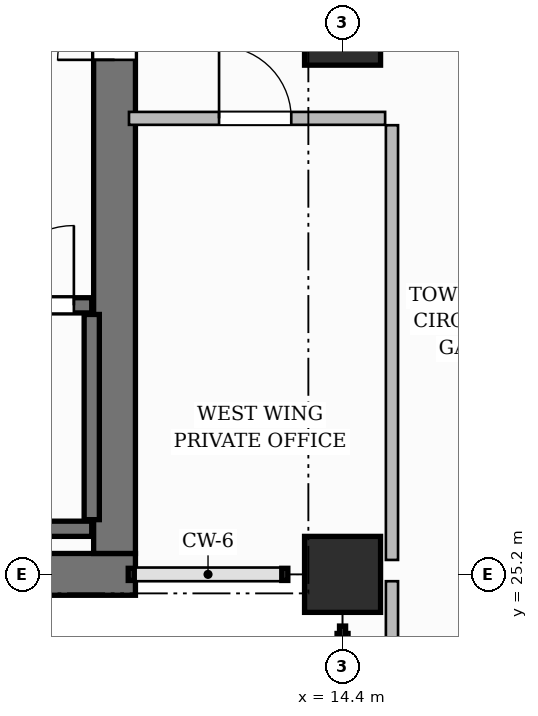
"""IFC4 building model, lengths in metres.
Left out: names, types, materials, properties, quantities, classifications, styles, units other than length and angle.
Written with IfcOpenShell. Run it as: python <this file> out.ifc"""

import sys

from ifc_helpers import new_model, si_unit, direction, frame, frame_2d, origin, origin_2d, place, context, subcontext, project, spatial, rectangle, extrude, source, transform, mapped, element, fill, save


model = new_model("IFC4")
c1 = context("Model", 3, precision=1e-05, world=origin(), true_north=direction((0.0, 1.0)))
c2 = subcontext(c1, "Body", "Model", "MODEL_VIEW")
j1 = project(units=[si_unit("LENGTHUNIT", "METRE"), si_unit("PLANEANGLEUNIT", "RADIAN")], contexts=[c1])
p1 = place(None, origin())
s1 = spatial("IfcSite", under=j1, at=p1, CompositionType="ELEMENT")
p2 = place(p1, origin())
s2 = spatial("IfcBuilding", under=s1, at=p2, CompositionType="ELEMENT")
p3 = place(p2, frame((0.0, 0.0, 122.9)))
s3 = spatial("IfcBuildingStorey", under=s2, at=p3, CompositionType="ELEMENT", Elevation=122.9)
p4 = place(p3, frame((3.325, 25.2, 0.0), z_axis=(0.0, 0.0, 1.0), x_axis=(1.0, 0.0, 0.0)))
e1 = element("IfcWall", 1, at=p4, inside=s3, PredefinedType="SHEAR", context=c2, shape_type="SweptSolid", body=[
    extrude(rectangle(XDim=8.35, YDim=0.55, at=frame_2d((4.175, 0.0))), origin(), (0.0, 0.0, 1.0), 3.7),
])
p5 = place(p3, frame((11.4, 25.475, 0.0), z_axis=(0.0, 0.0, 1.0), x_axis=(0.0, 1.0, 0.0)))
e2 = element("IfcWall", 2, at=p5, inside=s3, PredefinedType="SHEAR", context=c2, shape_type="SweptSolid", body=[
    extrude(rectangle(XDim=13.85, YDim=0.55, at=frame_2d((6.925, 0.0))), origin(), (0.0, 0.0, 1.0), 3.7),
])
p6 = place(p5, frame((6.495, 0.0, 0.0)))
e3 = element("IfcOpeningElement", 3, at=p6, cuts=e2, PredefinedType="OPENING", context=c2, shape_type="SweptSolid", body=[
    extrude(rectangle(XDim=1.5, YDim=2.2, at=frame_2d((0.75, 1.1))), frame((0.0, 0.285, 0.0), z_axis=(0.0, -1.0, 0.0), x_axis=(1.0, 0.0, 0.0)), (0.0, 0.0, 1.0), 0.57),
])
m1 = source(origin(), c2, "Body", "SweptSolid", [
    extrude(rectangle(XDim=1.0, YDim=1.0, at=origin_2d()), origin(), (0.0, 0.0, 1.0), 3.7),
])
for number, where, z_axis, x_axis in (
    (4, (14.4, 25.2, 0.0), (0.0, 0.0, 1.0), (1.0, 0.0, 0.0)),
    (5, (14.4, 32.4, 0.0), (0.0, 0.0, 1.0), (1.0, 0.0, 0.0)),
):
    element("IfcColumn", number, at=place(p3, frame(where, z_axis=z_axis, x_axis=x_axis)), inside=s3, PredefinedType="COLUMN", context=c2, shape_type="MappedRepresentation", body=[
        mapped(m1, transform((0.0, 0.0, 0.0), scale=1.0)),
    ])
p7 = place(p3, frame((4.0, 25.8, 0.0), z_axis=(0.0, 0.0, 1.0), x_axis=(1.0, 0.0, 0.0)))
e6 = element("IfcWall", 6, at=p7, inside=s3, PredefinedType="SHEAR", context=c2, shape_type="SweptSolid", body=[
    extrude(rectangle(XDim=7.1, YDim=0.2, at=frame_2d((3.55, 0.0))), origin(), (0.0, 0.0, 1.0), 3.7),
])
p8 = place(p3, frame((11.1, 25.92, 0.0), z_axis=(0.0, 0.0, 1.0), x_axis=(0.0, 1.0, 0.0)))
e7 = element("IfcWall", 7, at=p8, inside=s3, PredefinedType="SHEAR", context=c2, shape_type="SweptSolid", body=[
    extrude(rectangle(XDim=2.7, YDim=0.2, at=frame_2d((1.35, 0.0))), origin(), (0.0, 0.0, 1.0), 3.7),
])
p9 = place(p3, frame((4.0, 28.74, 0.0), z_axis=(0.0, 0.0, 1.0), x_axis=(1.0, 0.0, 0.0)))
e8 = element("IfcWall", 8, at=p9, inside=s3, PredefinedType="SHEAR", context=c2, shape_type="SweptSolid", body=[
    extrude(rectangle(XDim=7.1, YDim=0.2, at=frame_2d((3.55, 0.0))), origin(), (0.0, 0.0, 1.0), 3.7),
])
p10 = place(p9, frame((5.815, 0.0, 0.0)))
e9 = element("IfcOpeningElement", 9, at=p10, cuts=e8, PredefinedType="OPENING", context=c2, shape_type="SweptSolid", body=[
    extrude(rectangle(XDim=1.05, YDim=2.2, at=frame_2d((0.525, 1.1))), frame((0.0, 0.11, 0.0), z_axis=(0.0, -1.0, 0.0), x_axis=(1.0, 0.0, 0.0)), (0.0, 0.0, 1.0), 0.22),
])
p11 = place(p3, frame((15.05, 12.36, 0.0), z_axis=(0.0, 0.0, 1.0), x_axis=(0.0, 1.0, 0.0)))
e10 = element("IfcWall", 10, at=p11, inside=s3, PredefinedType="PARTITIONING", context=c2, shape_type="SweptSolid", body=[
    extrude(rectangle(XDim=12.75, YDim=0.16, at=frame_2d((6.375, 0.0))), origin(), (0.0, 0.0, 1.0), 3.45),
])
p12 = place(p3, frame((15.05, 25.39, 0.0), z_axis=(0.0, 0.0, 1.0), x_axis=(0.0, 1.0, 0.0)))
e11 = element("IfcWall", 11, at=p12, inside=s3, PredefinedType="PARTITIONING", context=c2, shape_type="SweptSolid", body=[
    extrude(rectangle(XDim=5.72, YDim=0.16, at=frame_2d((2.86, 0.0))), origin(), (0.0, 0.0, 1.0), 3.45),
])
p13 = place(p3, frame((11.59, 31.2, 0.0), z_axis=(0.0, 0.0, 1.0), x_axis=(1.0, 0.0, 0.0)))
e12 = element("IfcWall", 12, at=p13, inside=s3, PredefinedType="PARTITIONING", context=c2, shape_type="SweptSolid", body=[
    extrude(rectangle(XDim=3.37, YDim=0.17, at=frame_2d((1.685, 0.0))), origin(), (0.0, 0.0, 1.0), 3.45),
])
p14 = place(p13, frame((1.185, 0.0, 0.0)))
e13 = element("IfcOpeningElement", 13, at=p14, cuts=e12, PredefinedType="OPENING", context=c2, shape_type="SweptSolid", body=[
    extrude(rectangle(XDim=0.95, YDim=2.15, at=frame_2d((0.475, 1.075))), frame((0.0, 0.095, 0.0), z_axis=(0.0, -1.0, 0.0), x_axis=(1.0, 0.0, 0.0)), (0.0, 0.0, 1.0), 0.19),
])
m2 = source(origin(), c2, "Body", "SweptSolid", [
    extrude(rectangle(XDim=1.05, YDim=2.2, at=frame_2d((0.525, 1.1))), frame((0.0, 0.025, 0.0), z_axis=(0.0, -1.0, 0.0), x_axis=(1.0, 0.0, 0.0)), (0.0, 0.0, 1.0), 0.05),
])
p15 = place(p10, origin())
e14 = element("IfcDoor", 14, at=p15, inside=s3, OperationType="SINGLE_SWING_RIGHT", PredefinedType="DOOR", context=c2, shape_type="MappedRepresentation", body=[
    mapped(m2, transform((0.0, 0.0, 0.0), scale=1.0)),
])
fill(e9, e14)
m3 = source(origin(), c2, "Body", "SweptSolid", [
    extrude(rectangle(XDim=1.5, YDim=2.2, at=frame_2d((0.75, 1.1))), frame((0.0, 0.025, 0.0), z_axis=(0.0, -1.0, 0.0), x_axis=(1.0, 0.0, 0.0)), (0.0, 0.0, 1.0), 0.05),
])
p16 = place(p6, origin())
e15 = element("IfcDoor", 15, at=p16, inside=s3, OperationType="DOUBLE_DOOR_SINGLE_SWING", PredefinedType="DOOR", context=c2, shape_type="MappedRepresentation", body=[
    mapped(m3, transform((0.0, 0.0, 0.0), scale=1.0)),
])
fill(e3, e15)
m4 = source(origin(), c2, "Body", "SweptSolid", [
    extrude(rectangle(XDim=0.95, YDim=2.15, at=frame_2d((0.475, 1.075))), frame((0.0, 0.025, 0.0), z_axis=(0.0, -1.0, 0.0), x_axis=(1.0, 0.0, 0.0)), (0.0, 0.0, 1.0), 0.05),
])
p17 = place(p14, origin())
e16 = element("IfcDoor", 16, at=p17, inside=s3, OperationType="SINGLE_SWING_LEFT", PredefinedType="DOOR", context=c2, shape_type="MappedRepresentation", body=[
    mapped(m4, transform((0.0, 0.0, 0.0), scale=1.0)),
])
fill(e13, e16)
save(model, sys.argv[1])
